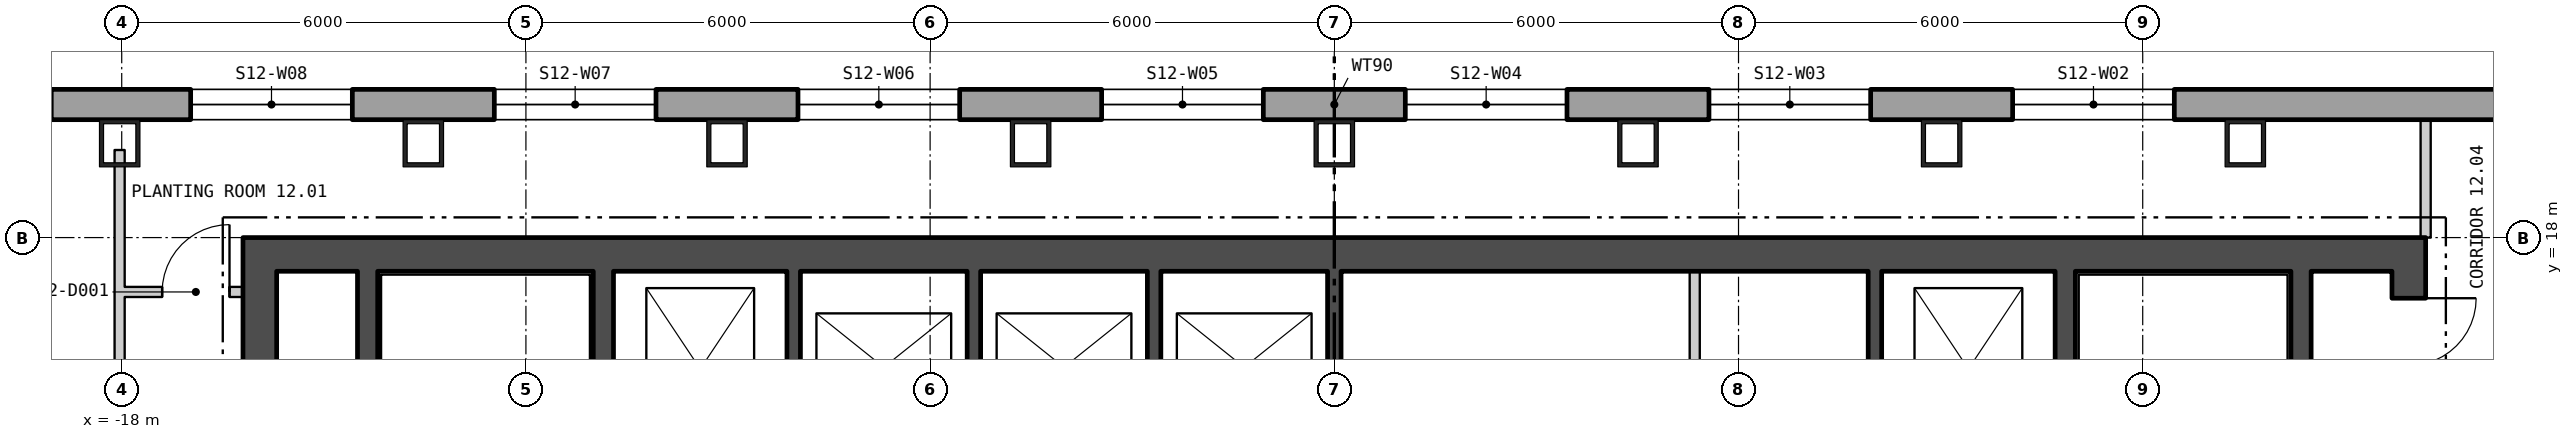
"""IFC4 building model, lengths in metres.
Left out: names, types, materials, properties, quantities, classifications, styles, units other than length and angle.
Written with IfcOpenShell. Run it as: python <this file> out.ifc"""

import sys

from ifc_helpers import new_model, si_unit, direction, frame, frame_2d, origin, origin_2d, place, context, subcontext, project, spatial, polyline, rectangle, hollow_rectangle, outline, extrude, element, fill, save


model = new_model("IFC4")
c1 = context("Model", 3, precision=1e-05, world=origin(), true_north=direction((0.0, 1.0)))
c2 = subcontext(c1, "Body", "Model", "MODEL_VIEW")
j1 = project(units=[si_unit("LENGTHUNIT", "METRE"), si_unit("PLANEANGLEUNIT", "RADIAN")], contexts=[c1])
p1 = place(None, origin())
s1 = spatial("IfcSite", under=j1, at=p1, CompositionType="ELEMENT")
p2 = place(p1, origin())
s2 = spatial("IfcBuilding", under=s1, at=p2, CompositionType="ELEMENT")
p3 = place(p2, frame((0.0, 0.0, 163.2)))
s3 = spatial("IfcBuildingStorey", under=s2, at=p3, CompositionType="ELEMENT", Elevation=163.2)
for number, where, z_axis, x_axis in (
    (1, (13.523, 19.4, 0.0), (0.0, 0.0, 1.0), (-1.0, 0.0, 0.0)),
    (2, (9.015, 19.4, 0.0), (0.0, 0.0, 1.0), (-1.0, 0.0, 0.0)),
    (3, (4.508, 19.4, 0.0), (0.0, 0.0, 1.0), (-1.0, 0.0, 0.0)),
    (4, (0.0, 19.4, 0.0), (0.0, 0.0, 1.0), (-1.0, 0.0, 0.0)),
    (5, (-4.508, 19.4, 0.0), (0.0, 0.0, 1.0), (-1.0, 0.0, 0.0)),
    (6, (-9.015, 19.4, 0.0), (0.0, 0.0, 1.0), (-1.0, 0.0, 0.0)),
    (7, (-13.523, 19.4, 0.0), (0.0, 0.0, 1.0), (-1.0, 0.0, 0.0)),
    (8, (-18.03, 19.4, 0.0), (0.0, 0.0, 1.0), (-1.0, 0.0, 0.0)),
):
    element("IfcColumn", number, at=place(p3, frame(where, z_axis=z_axis, x_axis=x_axis)), inside=s3, PredefinedType="COLUMN", context=c2, shape_type="SweptSolid", body=[
        extrude(hollow_rectangle(XDim=0.6, YDim=0.7, WallThickness=0.06, at=origin_2d()), origin(), (0.0, 0.0, 1.0), 3.9),
    ])
p4 = place(p3, frame((22.87, 19.975, -0.4), z_axis=(0.0, 0.0, 1.0), x_axis=(-1.0, 0.0, 0.0)))
e9 = element("IfcWall", 9, at=p4, inside=s3, PredefinedType="SOLIDWALL", context=c2, shape_type="SweptSolid", body=[
    extrude(outline(polyline([(-0.13, -0.225), (45.87, -0.225), (45.61, 0.225), (0.13, 0.225), (-0.13, -0.225)])), origin(), (0.0, 0.0, 1.0), 3.9),
])
p5 = place(p4, frame((1.424, 0.0, 1.3)))
e10 = element("IfcOpeningElement", 10, at=p5, cuts=e9, PredefinedType="OPENING", context=c2, shape_type="SweptSolid", body=[
    extrude(rectangle(XDim=2.4, YDim=2.0, at=frame_2d((1.2, 1.0))), frame((0.0, 0.235, 0.0), z_axis=(0.0, -1.0, 0.0), x_axis=(1.0, 0.0, 0.0)), (0.0, 0.0, 1.0), 0.47),
])
p6 = place(p4, frame((10.401, 0.0, 1.3)))
e11 = element("IfcOpeningElement", 11, at=p6, cuts=e9, PredefinedType="OPENING", context=c2, shape_type="SweptSolid", body=[
    extrude(rectangle(XDim=2.4, YDim=2.0, at=frame_2d((1.2, 1.0))), frame((0.0, 0.235, 0.0), z_axis=(0.0, -1.0, 0.0), x_axis=(1.0, 0.0, 0.0)), (0.0, 0.0, 1.0), 0.47),
])
p7 = place(p4, frame((14.909, 0.0, 1.3)))
e12 = element("IfcOpeningElement", 12, at=p7, cuts=e9, PredefinedType="OPENING", context=c2, shape_type="SweptSolid", body=[
    extrude(rectangle(XDim=2.4, YDim=2.0, at=frame_2d((1.2, 1.0))), frame((0.0, 0.235, 0.0), z_axis=(0.0, -1.0, 0.0), x_axis=(1.0, 0.0, 0.0)), (0.0, 0.0, 1.0), 0.47),
])
p8 = place(p4, frame((19.416, 0.0, 1.3)))
e13 = element("IfcOpeningElement", 13, at=p8, cuts=e9, PredefinedType="OPENING", context=c2, shape_type="SweptSolid", body=[
    extrude(rectangle(XDim=2.4, YDim=2.0, at=frame_2d((1.2, 1.0))), frame((0.0, 0.235, 0.0), z_axis=(0.0, -1.0, 0.0), x_axis=(1.0, 0.0, 0.0)), (0.0, 0.0, 1.0), 0.47),
])
p9 = place(p4, frame((23.924, 0.0, 1.3)))
e14 = element("IfcOpeningElement", 14, at=p9, cuts=e9, PredefinedType="OPENING", context=c2, shape_type="SweptSolid", body=[
    extrude(rectangle(XDim=2.4, YDim=2.0, at=frame_2d((1.2, 1.0))), frame((0.0, 0.235, 0.0), z_axis=(0.0, -1.0, 0.0), x_axis=(1.0, 0.0, 0.0)), (0.0, 0.0, 1.0), 0.47),
])
p10 = place(p4, frame((28.431, 0.0, 1.3)))
e15 = element("IfcOpeningElement", 15, at=p10, cuts=e9, PredefinedType="OPENING", context=c2, shape_type="SweptSolid", body=[
    extrude(rectangle(XDim=2.4, YDim=2.0, at=frame_2d((1.2, 1.0))), frame((0.0, 0.235, 0.0), z_axis=(0.0, -1.0, 0.0), x_axis=(1.0, 0.0, 0.0)), (0.0, 0.0, 1.0), 0.47),
])
p11 = place(p4, frame((32.939, 0.0, 1.3)))
e16 = element("IfcOpeningElement", 16, at=p11, cuts=e9, PredefinedType="OPENING", context=c2, shape_type="SweptSolid", body=[
    extrude(rectangle(XDim=2.4, YDim=2.0, at=frame_2d((1.2, 1.0))), frame((0.0, 0.235, 0.0), z_axis=(0.0, -1.0, 0.0), x_axis=(1.0, 0.0, 0.0)), (0.0, 0.0, 1.0), 0.47),
])
p12 = place(p4, frame((37.447, 0.0, 1.3)))
e17 = element("IfcOpeningElement", 17, at=p12, cuts=e9, PredefinedType="OPENING", context=c2, shape_type="SweptSolid", body=[
    extrude(rectangle(XDim=2.4, YDim=2.0, at=frame_2d((1.2, 1.0))), frame((0.0, 0.235, 0.0), z_axis=(0.0, -1.0, 0.0), x_axis=(1.0, 0.0, 0.0)), (0.0, 0.0, 1.0), 0.47),
])
p13 = place(p4, frame((41.916, 0.0, 1.3)))
e18 = element("IfcOpeningElement", 18, at=p13, cuts=e9, PredefinedType="OPENING", context=c2, shape_type="SweptSolid", body=[
    extrude(rectangle(XDim=2.4, YDim=2.0, at=frame_2d((1.2, 1.0))), frame((0.0, 0.235, 0.0), z_axis=(0.0, -1.0, 0.0), x_axis=(1.0, 0.0, 0.0)), (0.0, 0.0, 1.0), 0.47),
])
p14 = place(p3, frame((-16.2, 17.75, 0.0), z_axis=(0.0, 0.0, 1.0), x_axis=(1.0, 0.0, 0.0)))
e19 = element("IfcWall", 19, at=p14, inside=s3, PredefinedType="SHEAR", context=c2, shape_type="SweptSolid", body=[
    extrude(rectangle(XDim=32.4, YDim=0.5, at=frame_2d((16.2, 0.0))), origin(), (0.0, 0.0, 1.0), 3.7),
])
p15 = place(p3, frame((-15.95, 2.5, 0.0), z_axis=(0.0, 0.0, 1.0), x_axis=(0.0, 1.0, 0.0)))
e20 = element("IfcWall", 20, at=p15, inside=s3, PredefinedType="SHEAR", context=c2, shape_type="SweptSolid", body=[
    extrude(rectangle(XDim=15.0, YDim=0.5, at=frame_2d((7.5, 0.0))), origin(), (0.0, 0.0, 1.0), 3.7),
])
p16 = place(p15, frame((4.35, 0.0, 0.0)))
e21 = element("IfcOpeningElement", 21, at=p16, cuts=e20, PredefinedType="OPENING", context=c2, shape_type="SweptSolid", body=[
    extrude(rectangle(XDim=1.5, YDim=2.1, at=frame_2d((0.75, 1.05))), frame((0.0, 0.26, 0.0), z_axis=(0.0, -1.0, 0.0), x_axis=(1.0, 0.0, 0.0)), (0.0, 0.0, 1.0), 0.52),
])
p17 = place(p15, frame((0.4, 0.0, 0.0)))
e22 = element("IfcOpeningElement", 22, at=p17, cuts=e20, PredefinedType="OPENING", context=c2, shape_type="SweptSolid", body=[
    extrude(rectangle(XDim=0.9, YDim=2.1, at=frame_2d((0.45, 1.05))), frame((0.0, 0.26, 0.0), z_axis=(0.0, -1.0, 0.0), x_axis=(1.0, 0.0, 0.0)), (0.0, 0.0, 1.0), 0.52),
])
p18 = place(p15, frame((2.491, 0.0, 0.0)))
e23 = element("IfcOpeningElement", 23, at=p18, cuts=e20, PredefinedType="OPENING", context=c2, shape_type="SweptSolid", body=[
    extrude(rectangle(XDim=0.9, YDim=2.1, at=frame_2d((0.45, 1.05))), frame((0.0, 0.26, 0.0), z_axis=(0.0, -1.0, 0.0), x_axis=(1.0, 0.0, 0.0)), (0.0, 0.0, 1.0), 0.52),
])
p19 = place(p15, frame((7.996, 0.0, 0.0)))
e24 = element("IfcOpeningElement", 24, at=p19, cuts=e20, PredefinedType="OPENING", context=c2, shape_type="SweptSolid", body=[
    extrude(rectangle(XDim=1.0, YDim=2.1, at=frame_2d((0.5, 1.05))), frame((0.0, 0.26, 0.0), z_axis=(0.0, -1.0, 0.0), x_axis=(1.0, 0.0, 0.0)), (0.0, 0.0, 1.0), 0.52),
])
p20 = place(p15, frame((12.621, 0.0, 0.0)))
e25 = element("IfcOpeningElement", 25, at=p20, cuts=e20, PredefinedType="OPENING", context=c2, shape_type="SweptSolid", body=[
    extrude(rectangle(XDim=0.9, YDim=2.1, at=frame_2d((0.45, 1.05))), frame((0.0, 0.26, 0.0), z_axis=(0.0, -1.0, 0.0), x_axis=(1.0, 0.0, 0.0)), (0.0, 0.0, 1.0), 0.52),
])
p21 = place(p3, frame((15.95, 2.5, 0.0), z_axis=(0.0, 0.0, 1.0), x_axis=(0.0, 1.0, 0.0)))
e26 = element("IfcWall", 26, at=p21, inside=s3, PredefinedType="SHEAR", context=c2, shape_type="SweptSolid", body=[
    extrude(rectangle(XDim=15.0, YDim=0.5, at=frame_2d((7.5, 0.0))), origin(), (0.0, 0.0, 1.0), 3.7),
])
p22 = place(p21, frame((4.35, 0.0, 0.0)))
e27 = element("IfcOpeningElement", 27, at=p22, cuts=e26, PredefinedType="OPENING", context=c2, shape_type="SweptSolid", body=[
    extrude(rectangle(XDim=1.5, YDim=2.1, at=frame_2d((0.75, 1.05))), frame((0.0, 0.26, 0.0), z_axis=(0.0, -1.0, 0.0), x_axis=(1.0, 0.0, 0.0)), (0.0, 0.0, 1.0), 0.52),
])
p23 = place(p21, frame((0.4, 0.0, 0.0)))
e28 = element("IfcOpeningElement", 28, at=p23, cuts=e26, PredefinedType="OPENING", context=c2, shape_type="SweptSolid", body=[
    extrude(rectangle(XDim=0.9, YDim=2.1, at=frame_2d((0.45, 1.05))), frame((0.0, 0.26, 0.0), z_axis=(0.0, -1.0, 0.0), x_axis=(1.0, 0.0, 0.0)), (0.0, 0.0, 1.0), 0.52),
])
p24 = place(p21, frame((2.475, 0.0, 0.0)))
e29 = element("IfcOpeningElement", 29, at=p24, cuts=e26, PredefinedType="OPENING", context=c2, shape_type="SweptSolid", body=[
    extrude(rectangle(XDim=0.9, YDim=2.1, at=frame_2d((0.45, 1.05))), frame((0.0, 0.26, 0.0), z_axis=(0.0, -1.0, 0.0), x_axis=(1.0, 0.0, 0.0)), (0.0, 0.0, 1.0), 0.52),
])
p25 = place(p21, frame((9.163, 0.0, 0.0)))
e30 = element("IfcOpeningElement", 30, at=p25, cuts=e26, PredefinedType="OPENING", context=c2, shape_type="SweptSolid", body=[
    extrude(rectangle(XDim=0.9, YDim=2.1, at=frame_2d((0.45, 1.05))), frame((0.0, 0.26, 0.0), z_axis=(0.0, -1.0, 0.0), x_axis=(1.0, 0.0, 0.0)), (0.0, 0.0, 1.0), 0.52),
])
p26 = place(p21, frame((13.6, 0.0, 0.0)))
e31 = element("IfcOpeningElement", 31, at=p26, cuts=e26, PredefinedType="OPENING", context=c2, shape_type="SweptSolid", body=[
    extrude(rectangle(XDim=1.0, YDim=2.1, at=frame_2d((0.5, 1.05))), frame((0.0, 0.26, 0.0), z_axis=(0.0, -1.0, 0.0), x_axis=(1.0, 0.0, 0.0)), (0.0, 0.0, 1.0), 0.52),
])
p27 = place(p3, frame((-10.85, 2.5, 0.0), z_axis=(0.0, 0.0, 1.0), x_axis=(0.0, 1.0, 0.0)))
e32 = element("IfcWall", 32, at=p27, inside=s3, PredefinedType="SHEAR", context=c2, shape_type="SweptSolid", body=[
    extrude(rectangle(XDim=15.0, YDim=0.3, at=frame_2d((7.5, 0.0))), origin(), (0.0, 0.0, 1.0), 3.7),
])
p28 = place(p27, frame((3.475, 0.0, 0.0)))
e33 = element("IfcOpeningElement", 33, at=p28, cuts=e32, PredefinedType="OPENING", context=c2, shape_type="SweptSolid", body=[
    extrude(rectangle(XDim=1.25, YDim=2.1, at=frame_2d((0.625, 1.05))), frame((0.0, 0.16, 0.0), z_axis=(0.0, -1.0, 0.0), x_axis=(1.0, 0.0, 0.0)), (0.0, 0.0, 1.0), 0.32),
])
p29 = place(p27, frame((1.125, 0.0, 0.0)))
e34 = element("IfcOpeningElement", 34, at=p29, cuts=e32, PredefinedType="OPENING", context=c2, shape_type="SweptSolid", body=[
    extrude(rectangle(XDim=1.0, YDim=2.1, at=frame_2d((0.5, 1.05))), frame((0.0, 0.16, 0.0), z_axis=(0.0, -1.0, 0.0), x_axis=(1.0, 0.0, 0.0)), (0.0, 0.0, 1.0), 0.32),
])
p30 = place(p3, frame((-14.35, 2.5, 0.0), z_axis=(0.0, 0.0, 1.0), x_axis=(0.0, 1.0, 0.0)))
e35 = element("IfcWall", 35, at=p30, inside=s3, PredefinedType="SHEAR", context=c2, shape_type="SweptSolid", body=[
    extrude(rectangle(XDim=15.0, YDim=0.3, at=frame_2d((7.5, 0.0))), origin(), (0.0, 0.0, 1.0), 3.7),
])
p31 = place(p30, frame((4.35, 0.0, 0.0)))
e36 = element("IfcOpeningElement", 36, at=p31, cuts=e35, PredefinedType="OPENING", context=c2, shape_type="SweptSolid", body=[
    extrude(rectangle(XDim=1.5, YDim=2.1, at=frame_2d((0.75, 1.05))), frame((0.0, 0.16, 0.0), z_axis=(0.0, -1.0, 0.0), x_axis=(1.0, 0.0, 0.0)), (0.0, 0.0, 1.0), 0.32),
])
p32 = place(p3, frame((10.85, 2.5, 0.0), z_axis=(0.0, 0.0, 1.0), x_axis=(0.0, 1.0, 0.0)))
e37 = element("IfcWall", 37, at=p32, inside=s3, PredefinedType="SHEAR", context=c2, shape_type="SweptSolid", body=[
    extrude(rectangle(XDim=15.0, YDim=0.3, at=frame_2d((7.5, 0.0))), origin(), (0.0, 0.0, 1.0), 3.7),
])
p33 = place(p32, frame((3.475, 0.0, 0.0)))
e38 = element("IfcOpeningElement", 38, at=p33, cuts=e37, PredefinedType="OPENING", context=c2, shape_type="SweptSolid", body=[
    extrude(rectangle(XDim=1.25, YDim=2.1, at=frame_2d((0.625, 1.05))), frame((0.0, 0.16, 0.0), z_axis=(0.0, -1.0, 0.0), x_axis=(1.0, 0.0, 0.0)), (0.0, 0.0, 1.0), 0.32),
])
p34 = place(p32, frame((1.125, 0.0, 0.0)))
e39 = element("IfcOpeningElement", 39, at=p34, cuts=e37, PredefinedType="OPENING", context=c2, shape_type="SweptSolid", body=[
    extrude(rectangle(XDim=1.0, YDim=2.1, at=frame_2d((0.5, 1.05))), frame((0.0, 0.16, 0.0), z_axis=(0.0, -1.0, 0.0), x_axis=(1.0, 0.0, 0.0)), (0.0, 0.0, 1.0), 0.32),
])
p35 = place(p3, frame((14.35, 2.5, 0.0), z_axis=(0.0, 0.0, 1.0), x_axis=(0.0, 1.0, 0.0)))
e40 = element("IfcWall", 40, at=p35, inside=s3, PredefinedType="SHEAR", context=c2, shape_type="SweptSolid", body=[
    extrude(rectangle(XDim=15.0, YDim=0.3, at=frame_2d((7.5, 0.0))), origin(), (0.0, 0.0, 1.0), 3.7),
])
p36 = place(p35, frame((4.35, 0.0, 0.0)))
e41 = element("IfcOpeningElement", 41, at=p36, cuts=e40, PredefinedType="OPENING", context=c2, shape_type="SweptSolid", body=[
    extrude(rectangle(XDim=1.5, YDim=2.1, at=frame_2d((0.75, 1.05))), frame((0.0, 0.16, 0.0), z_axis=(0.0, -1.0, 0.0), x_axis=(1.0, 0.0, 0.0)), (0.0, 0.0, 1.0), 0.32),
])
for number, where, z_axis, x_axis in (
    (42, (-8.025, 14.7, 0.0), (0.0, 0.0, 1.0), (0.0, 1.0, 0.0)),
    (43, (-5.35, 14.7, 0.0), (0.0, 0.0, 1.0), (0.0, 1.0, 0.0)),
    (44, (-2.675, 14.7, 0.0), (0.0, 0.0, 1.0), (0.0, 1.0, 0.0)),
    (45, (0.0, 14.7, 0.0), (0.0, 0.0, 1.0), (0.0, 1.0, 0.0)),
):
    element("IfcWall", number, at=place(p3, frame(where, z_axis=z_axis, x_axis=x_axis)), inside=s3, PredefinedType="SHEAR", context=c2, shape_type="SweptSolid", body=[
        extrude(rectangle(XDim=2.8, YDim=0.2, at=frame_2d((1.4, 0.0))), origin(), (0.0, 0.0, 1.0), 3.7),
    ])
p37 = place(p3, frame((5.35, 14.7, 0.0), z_axis=(0.0, 0.0, 1.0), x_axis=(0.0, 1.0, 0.0)))
e46 = element("IfcWall", 46, at=p37, inside=s3, PredefinedType="PARTITIONING", context=c2, shape_type="SweptSolid", body=[
    extrude(rectangle(XDim=2.8, YDim=0.15, at=frame_2d((1.4, 0.0))), origin(), (0.0, 0.0, 1.0), 3.7),
])
p38 = place(p3, frame((8.025, 14.7, 0.0), z_axis=(0.0, 0.0, 1.0), x_axis=(0.0, 1.0, 0.0)))
e47 = element("IfcWall", 47, at=p38, inside=s3, PredefinedType="SHEAR", context=c2, shape_type="SweptSolid", body=[
    extrude(rectangle(XDim=2.8, YDim=0.2, at=frame_2d((1.4, 0.0))), origin(), (0.0, 0.0, 1.0), 3.7),
])
p39 = place(p3, frame((-18.031, 12.498, 0.0), z_axis=(0.0, 0.0, 1.0), x_axis=(0.0, 1.0, 0.0)))
e48 = element("IfcWall", 48, at=p39, inside=s3, PredefinedType="PARTITIONING", context=c2, shape_type="SweptSolid", body=[
    extrude(rectangle(XDim=6.802, YDim=0.15, at=frame_2d((3.401, 0.0))), origin(), (0.0, 0.0, 1.0), 3.7),
])
p40 = place(p3, frame((-17.956, 17.193, 0.0), z_axis=(0.0, 0.0, 1.0), x_axis=(1.0, 0.0, 0.0)))
e49 = element("IfcWall", 49, at=p40, inside=s3, PredefinedType="PARTITIONING", context=c2, shape_type="SweptSolid", body=[
    extrude(rectangle(XDim=1.756, YDim=0.15, at=frame_2d((0.878, 0.0))), origin(), (0.0, 0.0, 1.0), 3.7),
])
p41 = place(p40, frame((0.556, 0.0, 0.0)))
e50 = element("IfcOpeningElement", 50, at=p41, cuts=e49, PredefinedType="OPENING", context=c2, shape_type="SweptSolid", body=[
    extrude(rectangle(XDim=1.0, YDim=2.1, at=frame_2d((0.5, 1.05))), frame((0.0, 0.085, 0.0), z_axis=(0.0, -1.0, 0.0), x_axis=(1.0, 0.0, 0.0)), (0.0, 0.0, 1.0), 0.17),
])
p42 = place(p3, frame((16.2, 18.0, 0.0), z_axis=(0.0, 0.0, 1.0), x_axis=(0.0, 1.0, 0.0)))
e51 = element("IfcWall", 51, at=p42, inside=s3, PredefinedType="PARTITIONING", context=c2, shape_type="SweptSolid", body=[
    extrude(rectangle(XDim=1.75, YDim=0.15, at=frame_2d((0.875, 0.0))), origin(), (0.0, 0.0, 1.0), 3.7),
])
p43 = place(p6, origin())
e52 = element("IfcWindow", 52, at=p43, inside=s3, PartitioningType="SINGLE_PANEL", PredefinedType="WINDOW", context=c2, shape_type="SweptSolid", body=[
    extrude(rectangle(XDim=2.4, YDim=2.0, at=frame_2d((1.2, 1.0))), frame((0.0, 0.105, 0.0), z_axis=(0.0, -1.0, 0.0), x_axis=(1.0, 0.0, 0.0)), (0.0, 0.0, 1.0), 0.06),
])
fill(e11, e52)
p44 = place(p7, origin())
e53 = element("IfcWindow", 53, at=p44, inside=s3, PartitioningType="SINGLE_PANEL", PredefinedType="WINDOW", context=c2, shape_type="SweptSolid", body=[
    extrude(rectangle(XDim=2.4, YDim=2.0, at=frame_2d((1.2, 1.0))), frame((0.0, 0.105, 0.0), z_axis=(0.0, -1.0, 0.0), x_axis=(1.0, 0.0, 0.0)), (0.0, 0.0, 1.0), 0.06),
])
fill(e12, e53)
p45 = place(p8, origin())
e54 = element("IfcWindow", 54, at=p45, inside=s3, PartitioningType="SINGLE_PANEL", PredefinedType="WINDOW", context=c2, shape_type="SweptSolid", body=[
    extrude(rectangle(XDim=2.4, YDim=2.0, at=frame_2d((1.2, 1.0))), frame((0.0, 0.105, 0.0), z_axis=(0.0, -1.0, 0.0), x_axis=(1.0, 0.0, 0.0)), (0.0, 0.0, 1.0), 0.06),
])
fill(e13, e54)
p46 = place(p9, origin())
e55 = element("IfcWindow", 55, at=p46, inside=s3, PartitioningType="SINGLE_PANEL", PredefinedType="WINDOW", context=c2, shape_type="SweptSolid", body=[
    extrude(rectangle(XDim=2.4, YDim=2.0, at=frame_2d((1.2, 1.0))), frame((0.0, 0.105, 0.0), z_axis=(0.0, -1.0, 0.0), x_axis=(1.0, 0.0, 0.0)), (0.0, 0.0, 1.0), 0.06),
])
fill(e14, e55)
p47 = place(p10, origin())
e56 = element("IfcWindow", 56, at=p47, inside=s3, PartitioningType="SINGLE_PANEL", PredefinedType="WINDOW", context=c2, shape_type="SweptSolid", body=[
    extrude(rectangle(XDim=2.4, YDim=2.0, at=frame_2d((1.2, 1.0))), frame((0.0, 0.105, 0.0), z_axis=(0.0, -1.0, 0.0), x_axis=(1.0, 0.0, 0.0)), (0.0, 0.0, 1.0), 0.06),
])
fill(e15, e56)
p48 = place(p11, origin())
e57 = element("IfcWindow", 57, at=p48, inside=s3, PartitioningType="SINGLE_PANEL", PredefinedType="WINDOW", context=c2, shape_type="SweptSolid", body=[
    extrude(rectangle(XDim=2.4, YDim=2.0, at=frame_2d((1.2, 1.0))), frame((0.0, 0.105, 0.0), z_axis=(0.0, -1.0, 0.0), x_axis=(1.0, 0.0, 0.0)), (0.0, 0.0, 1.0), 0.06),
])
fill(e16, e57)
p49 = place(p12, origin())
e58 = element("IfcWindow", 58, at=p49, inside=s3, PartitioningType="SINGLE_PANEL", PredefinedType="WINDOW", context=c2, shape_type="SweptSolid", body=[
    extrude(rectangle(XDim=2.4, YDim=2.0, at=frame_2d((1.2, 1.0))), frame((0.0, 0.105, 0.0), z_axis=(0.0, -1.0, 0.0), x_axis=(1.0, 0.0, 0.0)), (0.0, 0.0, 1.0), 0.06),
])
fill(e17, e58)
p50 = place(p26, origin())
e59 = element("IfcDoor", 59, at=p50, inside=s3, OperationType="SINGLE_SWING_RIGHT", PredefinedType="DOOR", context=c2, shape_type="SweptSolid", body=[
    extrude(rectangle(XDim=1.0, YDim=2.1, at=frame_2d((0.5, 1.05))), frame((0.0, 0.025, 0.0), z_axis=(0.0, -1.0, 0.0), x_axis=(1.0, 0.0, 0.0)), (0.0, 0.0, 1.0), 0.05),
])
fill(e31, e59)
p51 = place(p41, origin())
e60 = element("IfcDoor", 60, at=p51, inside=s3, OperationType="SINGLE_SWING_LEFT", PredefinedType="DOOR", context=c2, shape_type="SweptSolid", body=[
    extrude(rectangle(XDim=1.0, YDim=2.1, at=frame_2d((0.5, 1.05))), frame((0.0, 0.025, 0.0), z_axis=(0.0, -1.0, 0.0), x_axis=(1.0, 0.0, 0.0)), (0.0, 0.0, 1.0), 0.05),
])
fill(e50, e60)
save(model, sys.argv[1])
